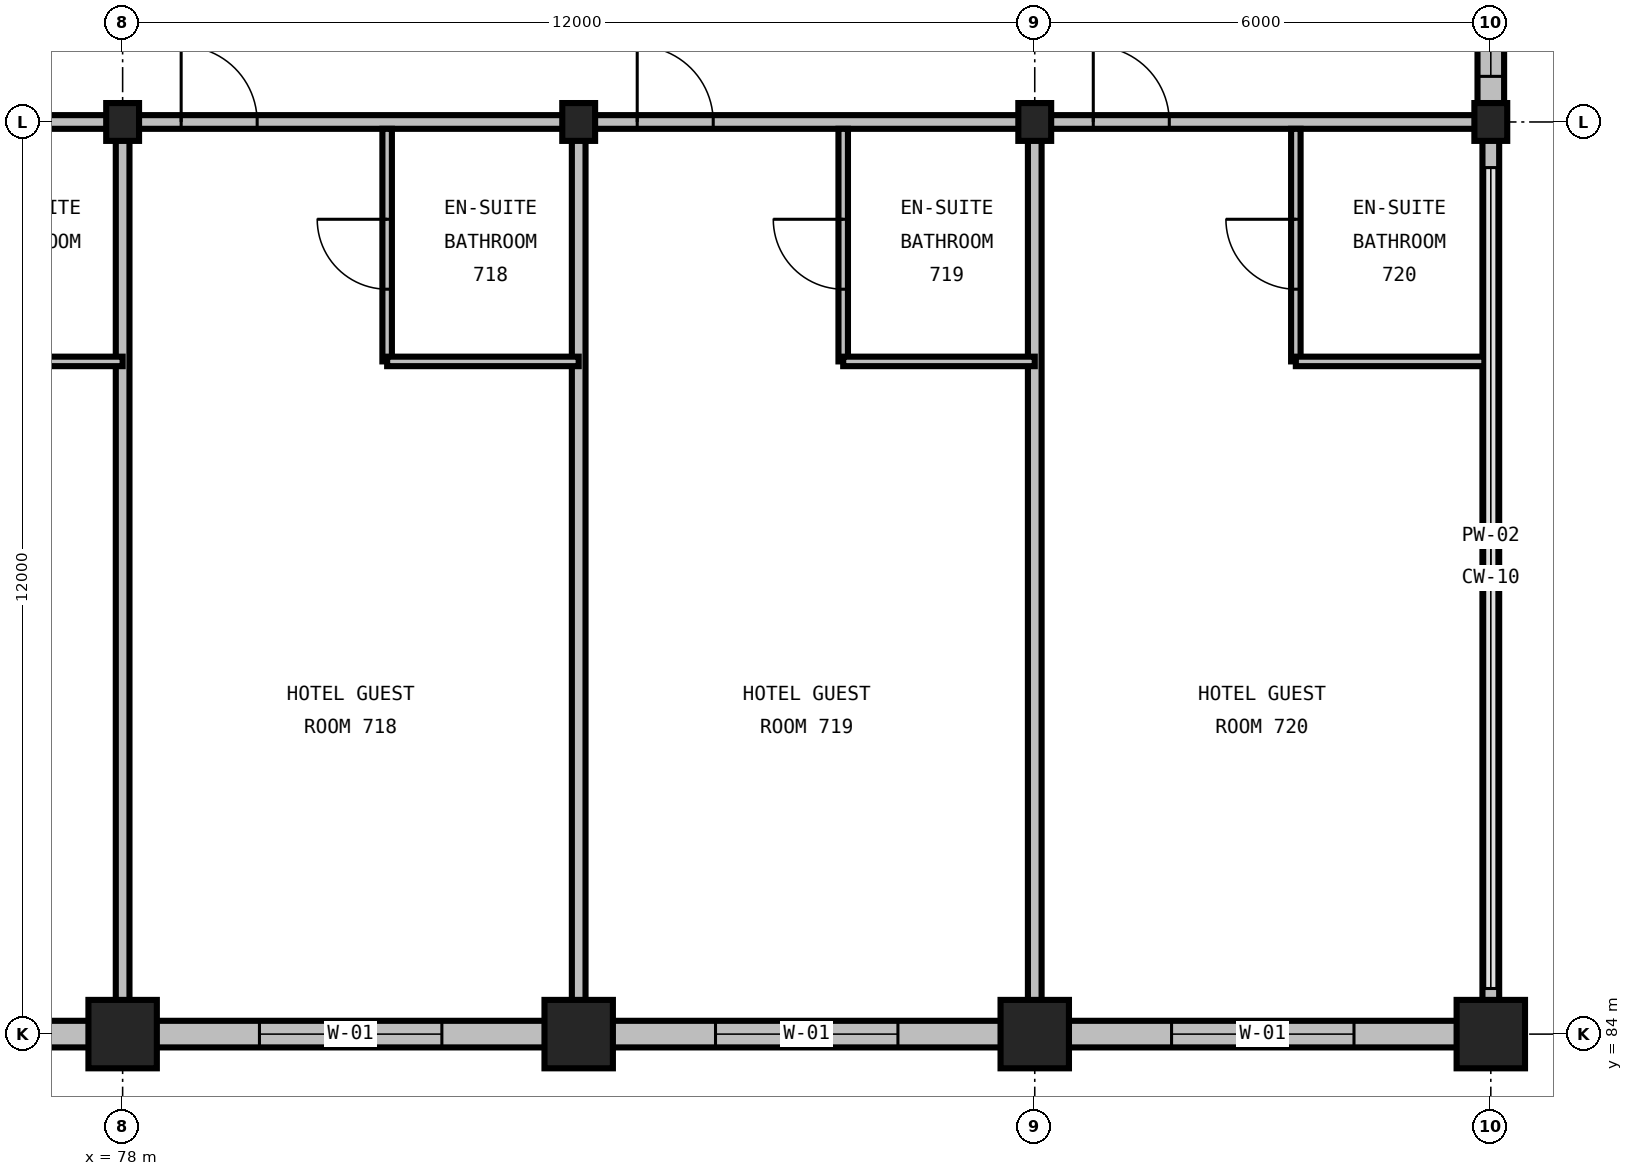
"""IFC4 building model, lengths in metres.
Left out: names, types, materials, properties, quantities, classifications, styles, units other than length and angle.
Written with IfcOpenShell. Run it as: python <this file> out.ifc"""

import sys

from ifc_helpers import new_model, si_unit, direction, frame, frame_2d, origin, origin_2d, place, context, subcontext, project, spatial, rectangle, i_section, extrude, element, fill, save


model = new_model("IFC4")
c1 = context("Model", 3, precision=1e-05, world=origin(), true_north=direction((0.0, 1.0)))
c2 = subcontext(c1, "Body", "Model", "MODEL_VIEW")
j1 = project(units=[si_unit("LENGTHUNIT", "METRE"), si_unit("PLANEANGLEUNIT", "RADIAN")], contexts=[c1])
p1 = place(None, origin())
s1 = spatial("IfcSite", under=j1, at=p1, CompositionType="ELEMENT")
p2 = place(p1, origin())
s2 = spatial("IfcBuilding", under=s1, at=p2, CompositionType="ELEMENT")
p3 = place(p2, frame((0.0, 0.0, 34.8)))
s3 = spatial("IfcBuildingStorey", under=s2, at=p3, CompositionType="ELEMENT", Elevation=34.8)
p4 = place(p3, frame((78.0, 84.0, 0.0), z_axis=(0.0, 0.0, 1.0), x_axis=(1.0, 0.0, 0.0)))
e1 = element("IfcColumn", 1, at=p4, inside=s3, PredefinedType="COLUMN", context=c2, shape_type="SweptSolid", body=[
    extrude(rectangle(XDim=0.9, YDim=0.9, at=origin_2d()), origin(), (0.0, 0.0, 1.0), 3.6),
])
p5 = place(p3, frame((78.0, 96.0, 0.0), z_axis=(0.0, 0.0, 1.0), x_axis=(1.0, 0.0, 0.0)))
e2 = element("IfcColumn", 2, at=p5, inside=s3, PredefinedType="COLUMN", context=c2, shape_type="SweptSolid", body=[
    extrude(i_section(OverallWidth=0.432, OverallDepth=0.498, WebThickness=0.056, FlangeThickness=0.089, FilletRadius=0.031, at=origin_2d()), origin(), (0.0, 0.0, 1.0), 3.6),
])
p6 = place(p3, frame((84.0, 84.0, 0.0), z_axis=(0.0, 0.0, 1.0), x_axis=(1.0, 0.0, 0.0)))
e3 = element("IfcColumn", 3, at=p6, inside=s3, PredefinedType="COLUMN", context=c2, shape_type="SweptSolid", body=[
    extrude(rectangle(XDim=0.9, YDim=0.9, at=origin_2d()), origin(), (0.0, 0.0, 1.0), 3.6),
])
p7 = place(p3, frame((84.0, 96.0, 0.0), z_axis=(0.0, 0.0, 1.0), x_axis=(1.0, 0.0, 0.0)))
e4 = element("IfcColumn", 4, at=p7, inside=s3, PredefinedType="COLUMN", context=c2, shape_type="SweptSolid", body=[
    extrude(i_section(OverallWidth=0.432, OverallDepth=0.498, WebThickness=0.056, FlangeThickness=0.089, FilletRadius=0.031, at=origin_2d()), origin(), (0.0, 0.0, 1.0), 3.6),
])
p8 = place(p3, frame((90.0, 84.0, 0.0), z_axis=(0.0, 0.0, 1.0), x_axis=(1.0, 0.0, 0.0)))
e5 = element("IfcColumn", 5, at=p8, inside=s3, PredefinedType="COLUMN", context=c2, shape_type="SweptSolid", body=[
    extrude(rectangle(XDim=0.9, YDim=0.9, at=origin_2d()), origin(), (0.0, 0.0, 1.0), 3.6),
])
p9 = place(p3, frame((90.0, 96.0, 0.0), z_axis=(0.0, 0.0, 1.0), x_axis=(1.0, 0.0, 0.0)))
e6 = element("IfcColumn", 6, at=p9, inside=s3, PredefinedType="COLUMN", context=c2, shape_type="SweptSolid", body=[
    extrude(i_section(OverallWidth=0.432, OverallDepth=0.498, WebThickness=0.056, FlangeThickness=0.089, FilletRadius=0.031, at=origin_2d()), origin(), (0.0, 0.0, 1.0), 3.6),
])
p10 = place(p3, frame((96.0, 84.0, 0.0), z_axis=(0.0, 0.0, 1.0), x_axis=(1.0, 0.0, 0.0)))
e7 = element("IfcColumn", 7, at=p10, inside=s3, PredefinedType="COLUMN", context=c2, shape_type="SweptSolid", body=[
    extrude(rectangle(XDim=0.9, YDim=0.9, at=origin_2d()), origin(), (0.0, 0.0, 1.0), 3.6),
])
p11 = place(p3, frame((96.0, 96.0, 0.0), z_axis=(0.0, 0.0, 1.0), x_axis=(1.0, 0.0, 0.0)))
e8 = element("IfcColumn", 8, at=p11, inside=s3, PredefinedType="COLUMN", context=c2, shape_type="SweptSolid", body=[
    extrude(i_section(OverallWidth=0.432, OverallDepth=0.498, WebThickness=0.056, FlangeThickness=0.089, FilletRadius=0.031, at=origin_2d()), origin(), (0.0, 0.0, 1.0), 3.6),
])
p12 = place(p3, frame((66.0, 84.0, 0.0), z_axis=(0.0, 0.0, 1.0), x_axis=(1.0, 0.0, 0.0)))
e9 = element("IfcWall", 9, at=p12, inside=s3, PredefinedType="STANDARD", context=c2, shape_type="SweptSolid", body=[
    extrude(rectangle(XDim=12.0, YDim=0.35, at=frame_2d((6.0, 0.0))), origin(), (0.0, 0.0, 1.0), 2.486),
])
p13 = place(p12, frame((1.8, 0.0, 0.75)))
e10 = element("IfcOpeningElement", 10, at=p13, cuts=e9, PredefinedType="OPENING", context=c2, shape_type="SweptSolid", body=[
    extrude(rectangle(XDim=2.4, YDim=1.65, at=frame_2d((1.2, 0.825))), frame((0.0, 0.19, 0.0), z_axis=(0.0, -1.0, 0.0), x_axis=(1.0, 0.0, 0.0)), (0.0, 0.0, 1.0), 0.38),
])
p14 = place(p12, frame((7.725, 0.0, 0.75)))
e11 = element("IfcOpeningElement", 11, at=p14, cuts=e9, PredefinedType="OPENING", context=c2, shape_type="SweptSolid", body=[
    extrude(rectangle(XDim=2.55, YDim=1.65, at=frame_2d((1.275, 0.825))), frame((0.0, 0.19, 0.0), z_axis=(0.0, -1.0, 0.0), x_axis=(1.0, 0.0, 0.0)), (0.0, 0.0, 1.0), 0.38),
])
p15 = place(p3, frame((78.0, 84.0, 0.0), z_axis=(0.0, 0.0, 1.0), x_axis=(1.0, 0.0, 0.0)))
e12 = element("IfcWall", 12, at=p15, inside=s3, PredefinedType="STANDARD", context=c2, shape_type="SweptSolid", body=[
    extrude(rectangle(XDim=6.0, YDim=0.35, at=frame_2d((3.0, 0.0))), origin(), (0.0, 0.0, 1.0), 2.486),
])
p16 = place(p15, frame((1.8, 0.0, 0.75)))
e13 = element("IfcOpeningElement", 13, at=p16, cuts=e12, PredefinedType="OPENING", context=c2, shape_type="SweptSolid", body=[
    extrude(rectangle(XDim=2.4, YDim=1.65, at=frame_2d((1.2, 0.825))), frame((0.0, 0.19, 0.0), z_axis=(0.0, -1.0, 0.0), x_axis=(1.0, 0.0, 0.0)), (0.0, 0.0, 1.0), 0.38),
])
p17 = place(p3, frame((84.0, 84.0, 0.0), z_axis=(0.0, 0.0, 1.0), x_axis=(1.0, 0.0, 0.0)))
e14 = element("IfcWall", 14, at=p17, inside=s3, PredefinedType="STANDARD", context=c2, shape_type="SweptSolid", body=[
    extrude(rectangle(XDim=6.0, YDim=0.35, at=frame_2d((3.0, 0.0))), origin(), (0.0, 0.0, 1.0), 2.486),
])
p18 = place(p17, frame((1.8, 0.0, 0.75)))
e15 = element("IfcOpeningElement", 15, at=p18, cuts=e14, PredefinedType="OPENING", context=c2, shape_type="SweptSolid", body=[
    extrude(rectangle(XDim=2.4, YDim=1.65, at=frame_2d((1.2, 0.825))), frame((0.0, 0.19, 0.0), z_axis=(0.0, -1.0, 0.0), x_axis=(1.0, 0.0, 0.0)), (0.0, 0.0, 1.0), 0.38),
])
p19 = place(p3, frame((90.0, 84.0, 0.0), z_axis=(0.0, 0.0, 1.0), x_axis=(1.0, 0.0, 0.0)))
e16 = element("IfcWall", 16, at=p19, inside=s3, PredefinedType="STANDARD", context=c2, shape_type="SweptSolid", body=[
    extrude(rectangle(XDim=6.0, YDim=0.35, at=frame_2d((3.0, 0.0))), origin(), (0.0, 0.0, 1.0), 2.486),
])
p20 = place(p19, frame((1.8, 0.0, 0.75)))
e17 = element("IfcOpeningElement", 17, at=p20, cuts=e16, PredefinedType="OPENING", context=c2, shape_type="SweptSolid", body=[
    extrude(rectangle(XDim=2.4, YDim=1.65, at=frame_2d((1.2, 0.825))), frame((0.0, 0.19, 0.0), z_axis=(0.0, -1.0, 0.0), x_axis=(1.0, 0.0, 0.0)), (0.0, 0.0, 1.0), 0.38),
])
p21 = place(p3, frame((96.0, 84.0, 0.0), z_axis=(0.0, 0.0, 1.0), x_axis=(0.0, 1.0, 0.0)))
e18 = element("IfcWall", 18, at=p21, inside=s3, PredefinedType="PARAPET", context=c2, shape_type="SweptSolid", body=[
    extrude(rectangle(XDim=12.0, YDim=0.22, at=frame_2d((6.0, 0.0))), origin(), (0.0, 0.0, 1.0), 0.2),
])
p22 = place(p3, frame((96.0, 96.0, 0.0), z_axis=(0.0, 0.0, 1.0), x_axis=(0.0, 1.0, 0.0)))
e19 = element("IfcWall", 19, at=p22, inside=s3, PredefinedType="STANDARD", context=c2, shape_type="SweptSolid", body=[
    extrude(rectangle(XDim=9.0, YDim=0.35, at=frame_2d((4.5, 0.0))), origin(), (0.0, 0.0, 1.0), 2.981),
])
p23 = place(p22, frame((0.6, 0.0, 0.85)))
e20 = element("IfcOpeningElement", 20, at=p23, cuts=e19, PredefinedType="OPENING", context=c2, shape_type="SweptSolid", body=[
    extrude(rectangle(XDim=1.8, YDim=1.5, at=frame_2d((0.9, 0.75))), frame((0.0, 0.19, 0.0), z_axis=(0.0, -1.0, 0.0), x_axis=(1.0, 0.0, 0.0)), (0.0, 0.0, 1.0), 0.38),
])
p24 = place(p3, frame((72.0, 96.0, 0.0), z_axis=(0.0, 0.0, 1.0), x_axis=(1.0, 0.0, 0.0)))
e21 = element("IfcWall", 21, at=p24, inside=s3, PredefinedType="PARTITIONING", context=c2, shape_type="SweptSolid", body=[
    extrude(rectangle(XDim=6.0, YDim=0.18, at=frame_2d((3.0, 0.0))), origin(), (0.0, 0.0, 1.0), 2.664),
])
p25 = place(p24, frame((0.55, 0.0, 0.0)))
e22 = element("IfcOpeningElement", 22, at=p25, cuts=e21, PredefinedType="OPENING", context=c2, shape_type="SweptSolid", body=[
    extrude(rectangle(XDim=1.0, YDim=2.15, at=frame_2d((0.5, 1.075))), frame((0.0, 0.105, 0.0), z_axis=(0.0, -1.0, 0.0), x_axis=(1.0, 0.0, 0.0)), (0.0, 0.0, 1.0), 0.21),
])
p26 = place(p3, frame((78.0, 84.175, 0.0), z_axis=(0.0, 0.0, 1.0), x_axis=(0.0, 1.0, 0.0)))
e23 = element("IfcWall", 23, at=p26, inside=s3, PredefinedType="PARTITIONING", context=c2, shape_type="SweptSolid", body=[
    extrude(rectangle(XDim=11.825, YDim=0.18, at=frame_2d((5.913, 0.0))), origin(), (0.0, 0.0, 1.0), 2.59),
])
p27 = place(p3, frame((75.48, 92.85, 0.0), z_axis=(0.0, 0.0, 1.0), x_axis=(1.0, 0.0, 0.0)))
e24 = element("IfcWall", 24, at=p27, inside=s3, PredefinedType="PARTITIONING", context=c2, shape_type="SweptSolid", body=[
    extrude(rectangle(XDim=2.52, YDim=0.125, at=frame_2d((1.26, 0.0))), origin(), (0.0, 0.0, 1.0), 3.29),
])
p28 = place(p3, frame((78.0, 96.0, 0.0), z_axis=(0.0, 0.0, 1.0), x_axis=(1.0, 0.0, 0.0)))
e25 = element("IfcWall", 25, at=p28, inside=s3, PredefinedType="PARTITIONING", context=c2, shape_type="SweptSolid", body=[
    extrude(rectangle(XDim=6.0, YDim=0.18, at=frame_2d((3.0, 0.0))), origin(), (0.0, 0.0, 1.0), 2.736),
])
p29 = place(p28, frame((0.77, 0.0, 0.0)))
e26 = element("IfcOpeningElement", 26, at=p29, cuts=e25, PredefinedType="OPENING", context=c2, shape_type="SweptSolid", body=[
    extrude(rectangle(XDim=1.0, YDim=2.15, at=frame_2d((0.5, 1.075))), frame((0.0, 0.105, 0.0), z_axis=(0.0, -1.0, 0.0), x_axis=(1.0, 0.0, 0.0)), (0.0, 0.0, 1.0), 0.21),
])
p30 = place(p3, frame((84.0, 84.175, 0.0), z_axis=(0.0, 0.0, 1.0), x_axis=(0.0, 1.0, 0.0)))
e27 = element("IfcWall", 27, at=p30, inside=s3, PredefinedType="PARTITIONING", context=c2, shape_type="SweptSolid", body=[
    extrude(rectangle(XDim=11.825, YDim=0.18, at=frame_2d((5.913, 0.0))), origin(), (0.0, 0.0, 1.0), 2.59),
])
p31 = place(p3, frame((81.48, 92.85, 0.0), z_axis=(0.0, 0.0, 1.0), x_axis=(0.0, 1.0, 0.0)))
e28 = element("IfcWall", 28, at=p31, inside=s3, PredefinedType="PARTITIONING", context=c2, shape_type="SweptSolid", body=[
    extrude(rectangle(XDim=3.06, YDim=0.125, at=frame_2d((1.53, 0.0))), origin(), (0.0, 0.0, 1.0), 3.29),
])
p32 = place(p31, frame((0.95, 0.0, 0.0)))
e29 = element("IfcOpeningElement", 29, at=p32, cuts=e28, PredefinedType="OPENING", context=c2, shape_type="SweptSolid", body=[
    extrude(rectangle(XDim=0.92, YDim=2.1, at=frame_2d((0.46, 1.05))), frame((0.0, 0.077, 0.0), z_axis=(0.0, -1.0, 0.0), x_axis=(1.0, 0.0, 0.0)), (0.0, 0.0, 1.0), 0.155),
])
p33 = place(p3, frame((81.48, 92.85, 0.0), z_axis=(0.0, 0.0, 1.0), x_axis=(1.0, 0.0, 0.0)))
e30 = element("IfcWall", 30, at=p33, inside=s3, PredefinedType="PARTITIONING", context=c2, shape_type="SweptSolid", body=[
    extrude(rectangle(XDim=2.52, YDim=0.125, at=frame_2d((1.26, 0.0))), origin(), (0.0, 0.0, 1.0), 3.29),
])
p34 = place(p3, frame((84.0, 96.0, 0.0), z_axis=(0.0, 0.0, 1.0), x_axis=(1.0, 0.0, 0.0)))
e31 = element("IfcWall", 31, at=p34, inside=s3, PredefinedType="PARTITIONING", context=c2, shape_type="SweptSolid", body=[
    extrude(rectangle(XDim=6.0, YDim=0.18, at=frame_2d((3.0, 0.0))), origin(), (0.0, 0.0, 1.0), 2.736),
])
p35 = place(p34, frame((0.77, 0.0, 0.0)))
e32 = element("IfcOpeningElement", 32, at=p35, cuts=e31, PredefinedType="OPENING", context=c2, shape_type="SweptSolid", body=[
    extrude(rectangle(XDim=1.0, YDim=2.15, at=frame_2d((0.5, 1.075))), frame((0.0, 0.105, 0.0), z_axis=(0.0, -1.0, 0.0), x_axis=(1.0, 0.0, 0.0)), (0.0, 0.0, 1.0), 0.21),
])
p36 = place(p3, frame((90.0, 84.175, 0.0), z_axis=(0.0, 0.0, 1.0), x_axis=(0.0, 1.0, 0.0)))
e33 = element("IfcWall", 33, at=p36, inside=s3, PredefinedType="PARTITIONING", context=c2, shape_type="SweptSolid", body=[
    extrude(rectangle(XDim=11.825, YDim=0.18, at=frame_2d((5.913, 0.0))), origin(), (0.0, 0.0, 1.0), 2.59),
])
p37 = place(p3, frame((87.48, 92.85, 0.0), z_axis=(0.0, 0.0, 1.0), x_axis=(0.0, 1.0, 0.0)))
e34 = element("IfcWall", 34, at=p37, inside=s3, PredefinedType="PARTITIONING", context=c2, shape_type="SweptSolid", body=[
    extrude(rectangle(XDim=3.06, YDim=0.125, at=frame_2d((1.53, 0.0))), origin(), (0.0, 0.0, 1.0), 3.29),
])
p38 = place(p37, frame((0.95, 0.0, 0.0)))
e35 = element("IfcOpeningElement", 35, at=p38, cuts=e34, PredefinedType="OPENING", context=c2, shape_type="SweptSolid", body=[
    extrude(rectangle(XDim=0.92, YDim=2.1, at=frame_2d((0.46, 1.05))), frame((0.0, 0.077, 0.0), z_axis=(0.0, -1.0, 0.0), x_axis=(1.0, 0.0, 0.0)), (0.0, 0.0, 1.0), 0.155),
])
p39 = place(p3, frame((87.48, 92.85, 0.0), z_axis=(0.0, 0.0, 1.0), x_axis=(1.0, 0.0, 0.0)))
e36 = element("IfcWall", 36, at=p39, inside=s3, PredefinedType="PARTITIONING", context=c2, shape_type="SweptSolid", body=[
    extrude(rectangle(XDim=2.52, YDim=0.125, at=frame_2d((1.26, 0.0))), origin(), (0.0, 0.0, 1.0), 3.29),
])
p40 = place(p3, frame((90.0, 96.0, 0.0), z_axis=(0.0, 0.0, 1.0), x_axis=(1.0, 0.0, 0.0)))
e37 = element("IfcWall", 37, at=p40, inside=s3, PredefinedType="PARTITIONING", context=c2, shape_type="SweptSolid", body=[
    extrude(rectangle(XDim=5.915, YDim=0.18, at=frame_2d((2.957, 0.0))), origin(), (0.0, 0.0, 1.0), 2.736),
])
p41 = place(p40, frame((0.77, 0.0, 0.0)))
e38 = element("IfcOpeningElement", 38, at=p41, cuts=e37, PredefinedType="OPENING", context=c2, shape_type="SweptSolid", body=[
    extrude(rectangle(XDim=1.0, YDim=2.15, at=frame_2d((0.5, 1.075))), frame((0.0, 0.105, 0.0), z_axis=(0.0, -1.0, 0.0), x_axis=(1.0, 0.0, 0.0)), (0.0, 0.0, 1.0), 0.21),
])
p42 = place(p3, frame((93.435, 92.85, 0.0), z_axis=(0.0, 0.0, 1.0), x_axis=(0.0, 1.0, 0.0)))
e39 = element("IfcWall", 39, at=p42, inside=s3, PredefinedType="PARTITIONING", context=c2, shape_type="SweptSolid", body=[
    extrude(rectangle(XDim=3.06, YDim=0.125, at=frame_2d((1.53, 0.0))), origin(), (0.0, 0.0, 1.0), 3.29),
])
p43 = place(p42, frame((0.95, 0.0, 0.0)))
e40 = element("IfcOpeningElement", 40, at=p43, cuts=e39, PredefinedType="OPENING", context=c2, shape_type="SweptSolid", body=[
    extrude(rectangle(XDim=0.92, YDim=2.1, at=frame_2d((0.46, 1.05))), frame((0.0, 0.077, 0.0), z_axis=(0.0, -1.0, 0.0), x_axis=(1.0, 0.0, 0.0)), (0.0, 0.0, 1.0), 0.155),
])
p44 = place(p3, frame((93.435, 92.85, 0.0), z_axis=(0.0, 0.0, 1.0), x_axis=(1.0, 0.0, 0.0)))
e41 = element("IfcWall", 41, at=p44, inside=s3, PredefinedType="PARTITIONING", context=c2, shape_type="SweptSolid", body=[
    extrude(rectangle(XDim=2.48, YDim=0.125, at=frame_2d((1.24, 0.0))), origin(), (0.0, 0.0, 1.0), 3.29),
])
p45 = place(p16, origin())
e42 = element("IfcWindow", 42, at=p45, inside=s3, PartitioningType="DOUBLE_PANEL_VERTICAL", PredefinedType="WINDOW", context=c2, shape_type="SweptSolid", body=[
    extrude(rectangle(XDim=2.4, YDim=1.65, at=frame_2d((1.2, 0.825))), frame((0.0, 0.03, 0.0), z_axis=(0.0, -1.0, 0.0), x_axis=(1.0, 0.0, 0.0)), (0.0, 0.0, 1.0), 0.06),
])
fill(e13, e42)
p46 = place(p18, origin())
e43 = element("IfcWindow", 43, at=p46, inside=s3, PartitioningType="DOUBLE_PANEL_VERTICAL", PredefinedType="WINDOW", context=c2, shape_type="SweptSolid", body=[
    extrude(rectangle(XDim=2.4, YDim=1.65, at=frame_2d((1.2, 0.825))), frame((0.0, 0.03, 0.0), z_axis=(0.0, -1.0, 0.0), x_axis=(1.0, 0.0, 0.0)), (0.0, 0.0, 1.0), 0.06),
])
fill(e15, e43)
p47 = place(p20, origin())
e44 = element("IfcWindow", 44, at=p47, inside=s3, PartitioningType="DOUBLE_PANEL_VERTICAL", PredefinedType="WINDOW", context=c2, shape_type="SweptSolid", body=[
    extrude(rectangle(XDim=2.4, YDim=1.65, at=frame_2d((1.2, 0.825))), frame((0.0, 0.03, 0.0), z_axis=(0.0, -1.0, 0.0), x_axis=(1.0, 0.0, 0.0)), (0.0, 0.0, 1.0), 0.06),
])
fill(e17, e44)
p48 = place(p23, origin())
e45 = element("IfcWindow", 45, at=p48, inside=s3, PartitioningType="SINGLE_PANEL", PredefinedType="WINDOW", context=c2, shape_type="SweptSolid", body=[
    extrude(rectangle(XDim=1.8, YDim=1.5, at=frame_2d((0.9, 0.75))), frame((0.0, 0.03, 0.0), z_axis=(0.0, -1.0, 0.0), x_axis=(1.0, 0.0, 0.0)), (0.0, 0.0, 1.0), 0.06),
])
fill(e20, e45)
p49 = place(p29, origin())
e46 = element("IfcDoor", 46, at=p49, inside=s3, OperationType="SINGLE_SWING_LEFT", PredefinedType="DOOR", context=c2, shape_type="SweptSolid", body=[
    extrude(rectangle(XDim=1.0, YDim=2.15, at=frame_2d((0.5, 1.075))), frame((0.0, 0.025, 0.0), z_axis=(0.0, -1.0, 0.0), x_axis=(1.0, 0.0, 0.0)), (0.0, 0.0, 1.0), 0.05),
])
fill(e26, e46)
p50 = place(p32, origin())
e47 = element("IfcDoor", 47, at=p50, inside=s3, OperationType="SINGLE_SWING_RIGHT", PredefinedType="DOOR", context=c2, shape_type="SweptSolid", body=[
    extrude(rectangle(XDim=0.92, YDim=2.1, at=frame_2d((0.46, 1.05))), frame((0.0, 0.025, 0.0), z_axis=(0.0, -1.0, 0.0), x_axis=(1.0, 0.0, 0.0)), (0.0, 0.0, 1.0), 0.05),
])
fill(e29, e47)
p51 = place(p35, origin())
e48 = element("IfcDoor", 48, at=p51, inside=s3, OperationType="SINGLE_SWING_LEFT", PredefinedType="DOOR", context=c2, shape_type="SweptSolid", body=[
    extrude(rectangle(XDim=1.0, YDim=2.15, at=frame_2d((0.5, 1.075))), frame((0.0, 0.025, 0.0), z_axis=(0.0, -1.0, 0.0), x_axis=(1.0, 0.0, 0.0)), (0.0, 0.0, 1.0), 0.05),
])
fill(e32, e48)
p52 = place(p38, origin())
e49 = element("IfcDoor", 49, at=p52, inside=s3, OperationType="SINGLE_SWING_RIGHT", PredefinedType="DOOR", context=c2, shape_type="SweptSolid", body=[
    extrude(rectangle(XDim=0.92, YDim=2.1, at=frame_2d((0.46, 1.05))), frame((0.0, 0.025, 0.0), z_axis=(0.0, -1.0, 0.0), x_axis=(1.0, 0.0, 0.0)), (0.0, 0.0, 1.0), 0.05),
])
fill(e35, e49)
p53 = place(p41, origin())
e50 = element("IfcDoor", 50, at=p53, inside=s3, OperationType="SINGLE_SWING_LEFT", PredefinedType="DOOR", context=c2, shape_type="SweptSolid", body=[
    extrude(rectangle(XDim=1.0, YDim=2.15, at=frame_2d((0.5, 1.075))), frame((0.0, 0.025, 0.0), z_axis=(0.0, -1.0, 0.0), x_axis=(1.0, 0.0, 0.0)), (0.0, 0.0, 1.0), 0.05),
])
fill(e38, e50)
p54 = place(p43, origin())
e51 = element("IfcDoor", 51, at=p54, inside=s3, OperationType="SINGLE_SWING_RIGHT", PredefinedType="DOOR", context=c2, shape_type="SweptSolid", body=[
    extrude(rectangle(XDim=0.92, YDim=2.1, at=frame_2d((0.46, 1.05))), frame((0.0, 0.025, 0.0), z_axis=(0.0, -1.0, 0.0), x_axis=(1.0, 0.0, 0.0)), (0.0, 0.0, 1.0), 0.05),
])
fill(e40, e51)
save(model, sys.argv[1])
